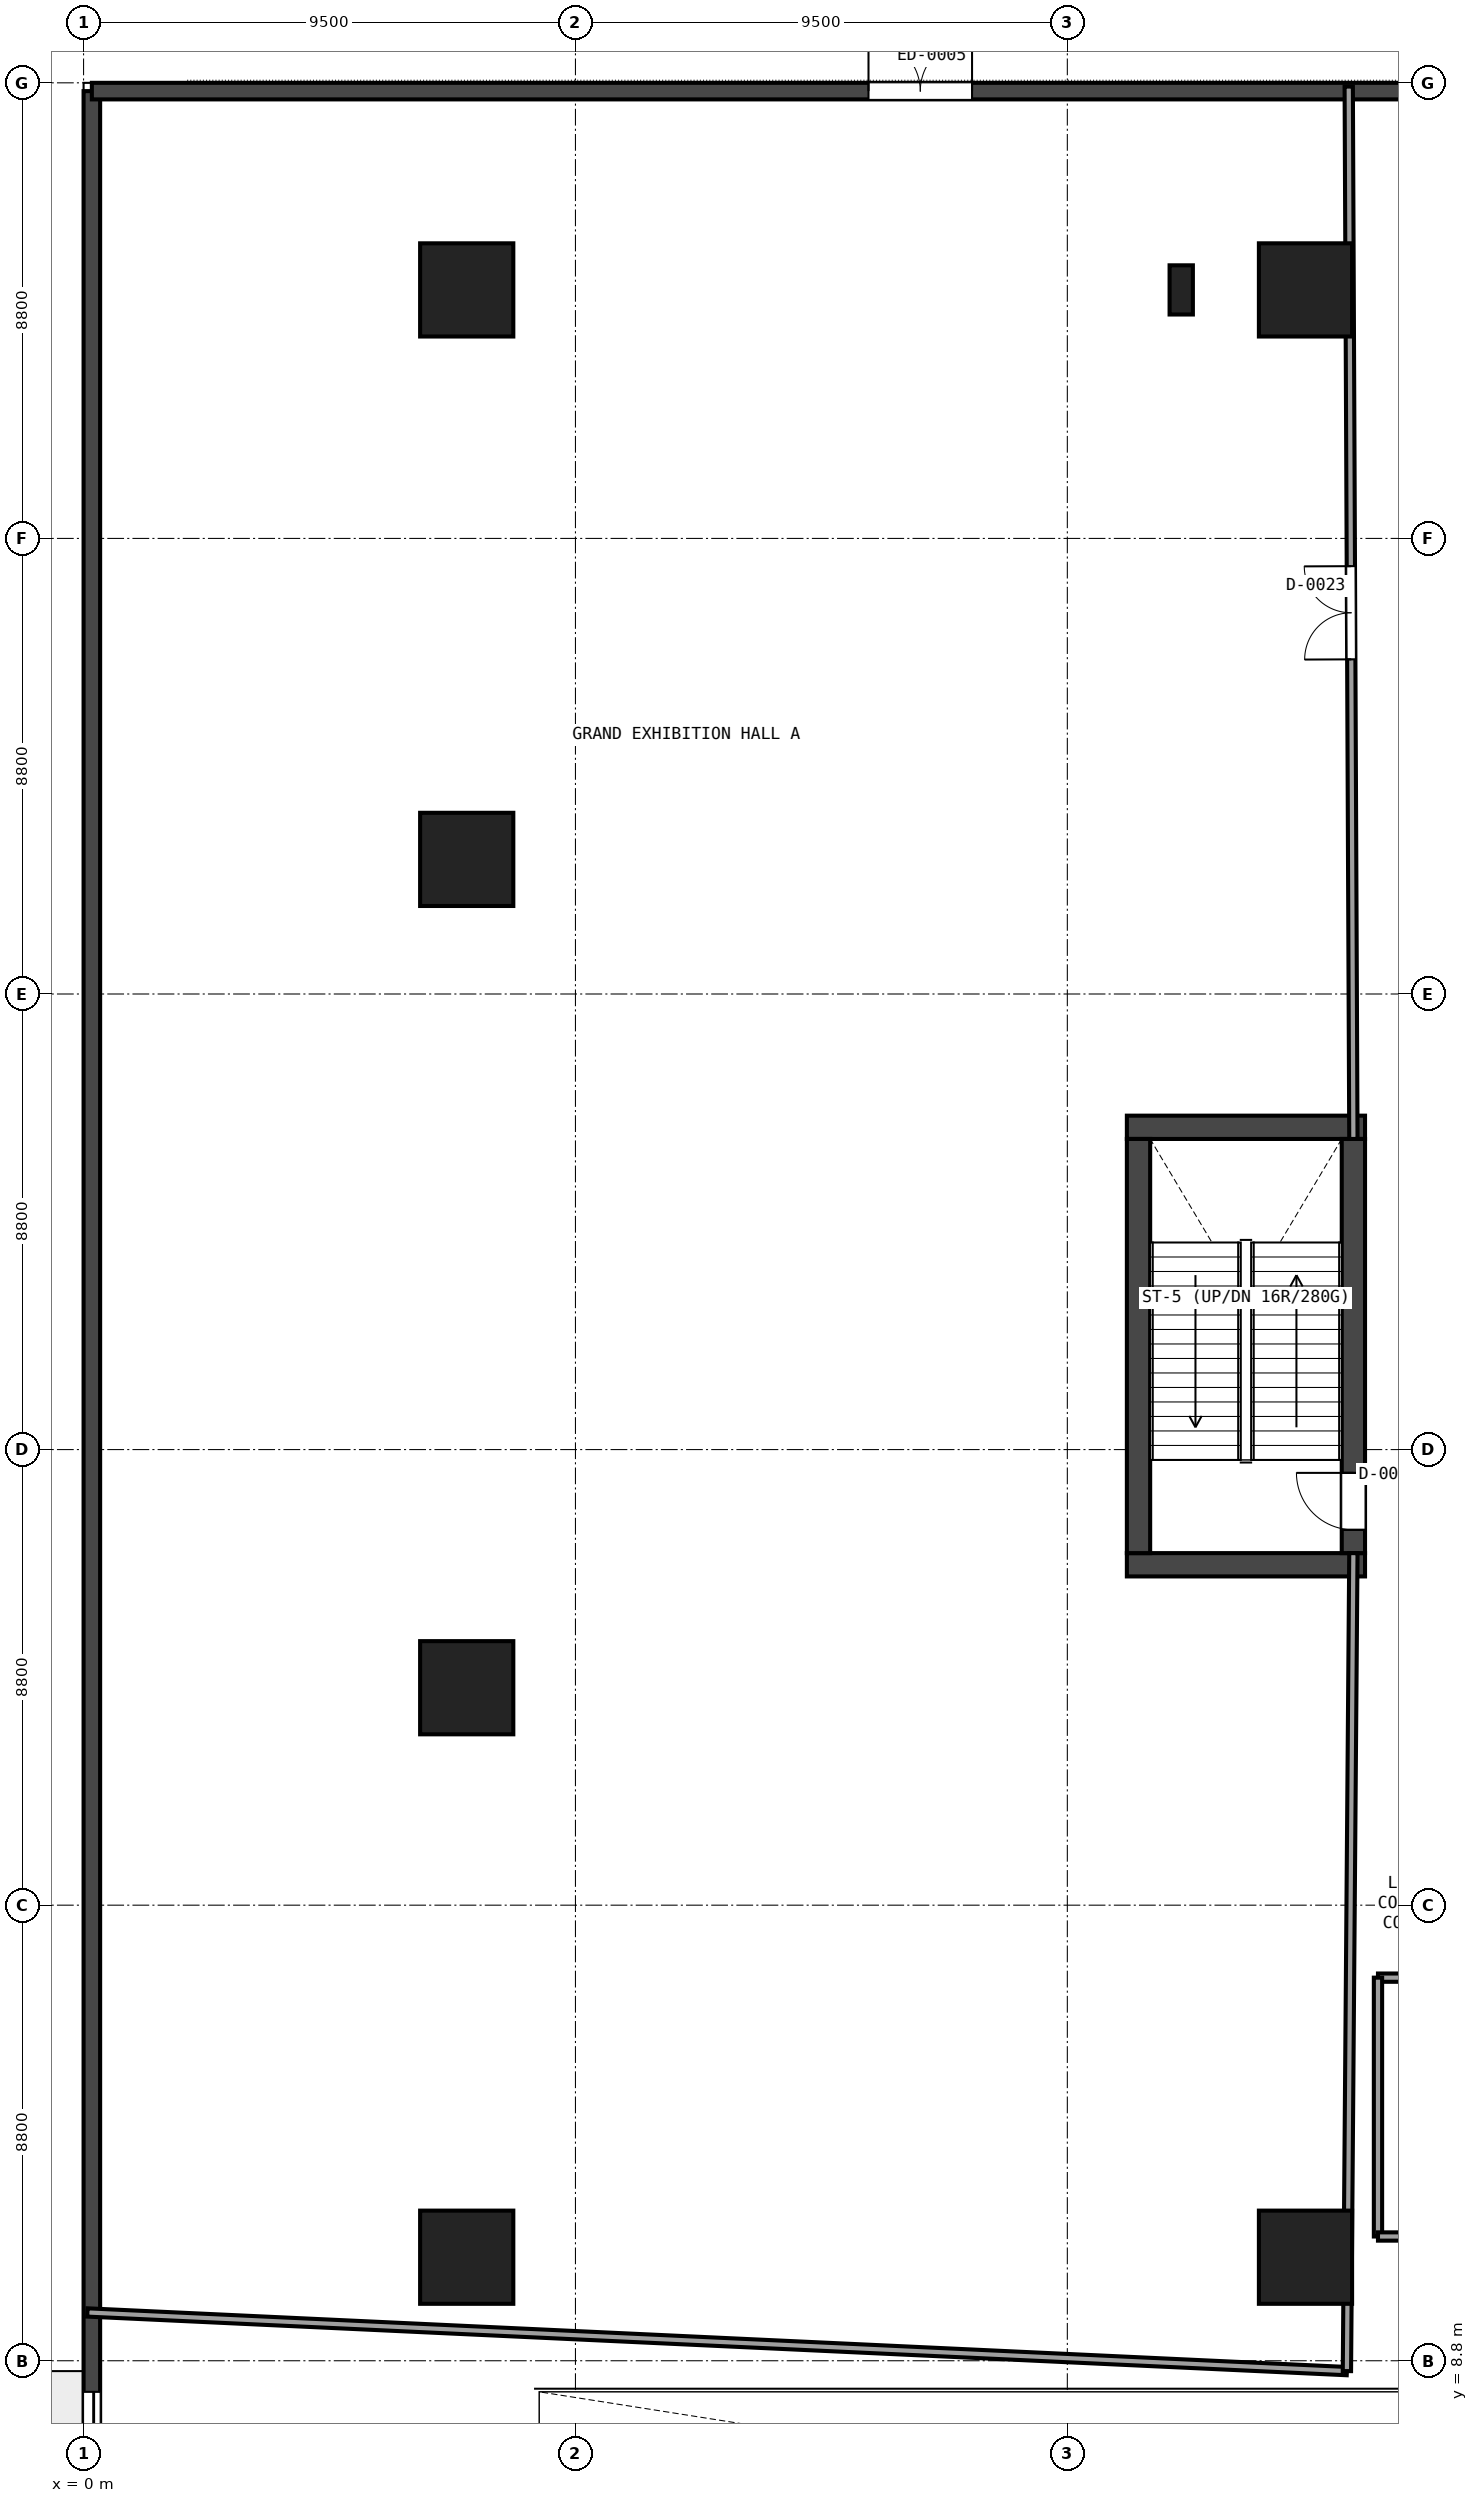
"""IFC4 building model, lengths in metres.
Left out: names, types, materials, properties, quantities, classifications, styles, units other than length and angle.
Written with IfcOpenShell. Run it as: python <this file> out.ifc"""

import sys

from ifc_helpers import new_model, si_unit, direction, frame, frame_2d, origin, origin_2d, place, context, subcontext, project, spatial, rectangle, extrude, element, fill, save


model = new_model("IFC4")
c1 = context("Model", 3, precision=1e-05, world=origin(), true_north=direction((0.0, 1.0)))
c2 = subcontext(c1, "Body", "Model", "MODEL_VIEW")
j1 = project(units=[si_unit("LENGTHUNIT", "METRE"), si_unit("PLANEANGLEUNIT", "RADIAN")], contexts=[c1])
p1 = place(None, origin())
s1 = spatial("IfcSite", under=j1, at=p1, CompositionType="ELEMENT")
p2 = place(p1, origin())
s2 = spatial("IfcBuilding", under=s1, at=p2, CompositionType="ELEMENT")
p3 = place(p2, origin())
s3 = spatial("IfcBuildingStorey", under=s2, at=p3, CompositionType="ELEMENT", Elevation=0.0)
for number, where, z_axis, x_axis in (
    (1, (20.15, 24.175, 0.0), (0.0, 0.0, 1.0), (1.0, 0.0, 0.0)),
    (2, (20.15, 32.625, 0.0), (0.0, 0.0, 1.0), (1.0, 0.0, 0.0)),
):
    element("IfcWall", number, at=place(p3, frame(where, z_axis=z_axis, x_axis=x_axis)), inside=s3, PredefinedType="SHEAR", context=c2, shape_type="SweptSolid", body=[
        extrude(rectangle(XDim=4.6, YDim=0.45, at=frame_2d((2.3, 0.0))), origin(), (0.0, 0.0, 1.0), 5.05),
    ])
p4 = place(p3, frame((20.375, 24.4, 0.0), z_axis=(0.0, 0.0, 1.0), x_axis=(0.0, 1.0, 0.0)))
e3 = element("IfcWall", 3, at=p4, inside=s3, PredefinedType="SHEAR", context=c2, shape_type="SweptSolid", body=[
    extrude(rectangle(XDim=8.0, YDim=0.45, at=frame_2d((4.0, 0.0))), origin(), (0.0, 0.0, 1.0), 5.05),
])
p5 = place(p3, frame((24.525, 24.4, 0.0), z_axis=(0.0, 0.0, 1.0), x_axis=(0.0, 1.0, 0.0)))
e4 = element("IfcWall", 4, at=p5, inside=s3, PredefinedType="SHEAR", context=c2, shape_type="SweptSolid", body=[
    extrude(rectangle(XDim=8.0, YDim=0.45, at=frame_2d((4.0, 0.0))), origin(), (0.0, 0.0, 1.0), 5.05),
])
p6 = place(p5, frame((0.45, 0.0, 0.0)))
e5 = element("IfcOpeningElement", 5, at=p6, cuts=e4, PredefinedType="OPENING", context=c2, shape_type="SweptSolid", body=[
    extrude(rectangle(XDim=1.1, YDim=2.15, at=frame_2d((0.55, 1.075))), frame((0.0, 0.235, 0.0), z_axis=(0.0, -1.0, 0.0), x_axis=(1.0, 0.0, 0.0)), (0.0, 0.0, 1.0), 0.47),
])
for number, where, z_axis, x_axis in (
    (6, (7.4, 10.8, 0.0), (0.0, 0.0, 1.0), (1.0, 0.0, 0.0)),
    (7, (23.6, 10.8, 0.0), (0.0, 0.0, 1.0), (1.0, 0.0, 0.0)),
    (8, (23.6, 48.8, 0.0), (0.0, 0.0, 1.0), (1.0, 0.0, 0.0)),
    (9, (7.4, 48.8, 0.0), (0.0, 0.0, 1.0), (1.0, 0.0, 0.0)),
    (10, (7.4, 37.8, 0.0), (0.0, 0.0, 1.0), (1.0, 0.0, 0.0)),
    (11, (7.4, 21.8, 0.0), (0.0, 0.0, 1.0), (1.0, 0.0, 0.0)),
):
    element("IfcColumn", number, at=place(p3, frame(where, z_axis=z_axis, x_axis=x_axis)), inside=s3, PredefinedType="COLUMN", context=c2, shape_type="SweptSolid", body=[
        extrude(rectangle(XDim=1.8, YDim=1.8, at=origin_2d()), origin(), (0.0, 0.0, 1.0), 5.05),
    ])
p7 = place(p3, frame((21.2, 48.8, 0.0), z_axis=(0.0, 0.0, 1.0), x_axis=(1.0, 0.0, 0.0)))
e12 = element("IfcColumn", 12, at=p7, inside=s3, PredefinedType="PILASTER", context=c2, shape_type="SweptSolid", body=[
    extrude(rectangle(XDim=0.45, YDim=0.95, at=origin_2d()), origin(), (0.0, 0.0, 1.0), 5.05),
])
p8 = place(p3, frame((0.16, 0.16, 0.0), z_axis=(0.0, 0.0, 1.0), x_axis=(0.0, 1.0, 0.0)))
e13 = element("IfcWall", 13, at=p8, inside=s3, PredefinedType="SOLIDWALL", context=c2, shape_type="SweptSolid", body=[
    extrude(rectangle(XDim=52.48, YDim=0.32, at=frame_2d((26.24, 0.0))), origin(), (0.0, 0.0, 1.0), 5.05),
])
p9 = place(p8, frame((1.24, 0.0, 0.0)))
e14 = element("IfcOpeningElement", 14, at=p9, cuts=e13, PredefinedType="OPENING", context=c2, shape_type="SweptSolid", body=[
    extrude(rectangle(XDim=6.8, YDim=3.6, at=frame_2d((3.4, 1.8))), frame((0.0, 0.17, 0.0), z_axis=(0.0, -1.0, 0.0), x_axis=(1.0, 0.0, 0.0)), (0.0, 0.0, 1.0), 0.34),
])
p10 = place(p3, frame((0.16, 52.64, 0.0), z_axis=(0.0, 0.0, 1.0), x_axis=(1.0, 0.0, 0.0)))
e15 = element("IfcWall", 15, at=p10, inside=s3, PredefinedType="SOLIDWALL", context=c2, shape_type="SweptSolid", body=[
    extrude(rectangle(XDim=75.68, YDim=0.32, at=frame_2d((37.84, 0.0))), origin(), (0.0, 0.0, 1.0), 5.05),
])
p11 = place(p10, frame((15.0, 0.0, 0.0)))
e16 = element("IfcOpeningElement", 16, at=p11, cuts=e15, PredefinedType="OPENING", context=c2, shape_type="SweptSolid", body=[
    extrude(rectangle(XDim=2.0, YDim=2.4, at=frame_2d((1.0, 1.2))), frame((0.0, 0.17, 0.0), z_axis=(0.0, -1.0, 0.0), x_axis=(1.0, 0.0, 0.0)), (0.0, 0.0, 1.0), 0.34),
])
p12 = place(p10, frame((29.5, 0.0, 0.0)))
e17 = element("IfcOpeningElement", 17, at=p12, cuts=e15, PredefinedType="OPENING", context=c2, shape_type="SweptSolid", body=[
    extrude(rectangle(XDim=2.0, YDim=2.4, at=frame_2d((1.0, 1.2))), frame((0.0, 0.17, 0.0), z_axis=(0.0, -1.0, 0.0), x_axis=(1.0, 0.0, 0.0)), (0.0, 0.0, 1.0), 0.34),
])
p13 = place(p10, frame((42.5, 0.0, 0.0)))
e18 = element("IfcOpeningElement", 18, at=p13, cuts=e15, PredefinedType="OPENING", context=c2, shape_type="SweptSolid", body=[
    extrude(rectangle(XDim=2.0, YDim=2.4, at=frame_2d((1.0, 1.2))), frame((0.0, 0.17, 0.0), z_axis=(0.0, -1.0, 0.0), x_axis=(1.0, 0.0, 0.0)), (0.0, 0.0, 1.0), 0.34),
])
p14 = place(p10, frame((58.0, 0.0, 0.0)))
e19 = element("IfcOpeningElement", 19, at=p14, cuts=e15, PredefinedType="OPENING", context=c2, shape_type="SweptSolid", body=[
    extrude(rectangle(XDim=2.0, YDim=2.4, at=frame_2d((1.0, 1.2))), frame((0.0, 0.17, 0.0), z_axis=(0.0, -1.0, 0.0), x_axis=(1.0, 0.0, 0.0)), (0.0, 0.0, 1.0), 0.34),
])
p15 = place(p3, frame((31.8, 16.2, 0.0), z_axis=(0.0, 0.0, 1.0), x_axis=(-1.0, 0.0, 0.0)))
e20 = element("IfcWall", 20, at=p15, inside=s3, PredefinedType="PARTITIONING", context=c2, shape_type="SweptSolid", body=[
    extrude(rectangle(XDim=6.8, YDim=0.16, at=frame_2d((3.4, 0.0))), origin(), (0.0, 0.0, 1.0), 4.135),
])
p16 = place(p15, frame((2.9, 0.0, 0.0)))
e21 = element("IfcOpeningElement", 21, at=p16, cuts=e20, PredefinedType="OPENING", context=c2, shape_type="SweptSolid", body=[
    extrude(rectangle(XDim=1.0, YDim=2.15, at=frame_2d((0.5, 1.075))), frame((0.0, 0.09, 0.0), z_axis=(0.0, -1.0, 0.0), x_axis=(1.0, 0.0, 0.0)), (0.0, 0.0, 1.0), 0.18),
])
p17 = place(p3, frame((25.0, 16.2, 0.0), z_axis=(0.0, 0.0, 1.0), x_axis=(0.0, -1.0, 0.0)))
e22 = element("IfcWall", 22, at=p17, inside=s3, PredefinedType="PARTITIONING", context=c2, shape_type="SweptSolid", body=[
    extrude(rectangle(XDim=5.0, YDim=0.16, at=frame_2d((2.5, 0.0))), origin(), (0.0, 0.0, 1.0), 4.135),
])
p18 = place(p3, frame((25.0, 11.2, 0.0), z_axis=(0.0, 0.0, 1.0), x_axis=(1.0, 0.0, 0.0)))
e23 = element("IfcWall", 23, at=p18, inside=s3, PredefinedType="PARTITIONING", context=c2, shape_type="SweptSolid", body=[
    extrude(rectangle(XDim=6.8, YDim=0.16, at=frame_2d((3.4, 0.0))), origin(), (0.0, 0.0, 1.0), 5.05),
])
p19 = place(p3, frame((24.525, 32.4, 0.0), z_axis=(0.0, 0.0, 1.0), x_axis=(-0.004419634006, 0.99999023337, 0.0)))
e24 = element("IfcWall", 24, at=p19, inside=s3, PredefinedType="PARTITIONING", context=c2, shape_type="SweptSolid", body=[
    extrude(rectangle(XDim=20.328, YDim=0.16, at=frame_2d((10.164, 0.0))), origin(), (0.0, 0.0, 1.0), 4.123),
])
p20 = place(p19, frame((9.264, 0.0, 0.0)))
e25 = element("IfcOpeningElement", 25, at=p20, cuts=e24, PredefinedType="OPENING", context=c2, shape_type="SweptSolid", body=[
    extrude(rectangle(XDim=1.8, YDim=2.25, at=frame_2d((0.9, 1.125))), frame((0.0, 0.09, 0.0), z_axis=(0.0, -1.0, 0.0), x_axis=(1.0, 0.0, 0.0)), (0.0, 0.0, 1.0), 0.18),
])
p21 = place(p3, frame((0.073, 9.733, 0.0), z_axis=(0.0, 0.0, 1.0), x_axis=(0.998917552656, -0.046515835978, 0.0)))
e26 = element("IfcWall", 26, at=p21, inside=s3, PredefinedType="PARTITIONING", context=c2, shape_type="SweptSolid", body=[
    extrude(rectangle(XDim=24.353, YDim=0.16, at=frame_2d((12.177, 0.0))), origin(), (0.0, 0.0, 1.0), 4.203),
])
p22 = place(p3, frame((24.4, 8.6, 0.0), z_axis=(0.0, 0.0, 1.0), x_axis=(0.007911242618, 0.99996870563, 0.0)))
e27 = element("IfcWall", 27, at=p22, inside=s3, PredefinedType="PARTITIONING", context=c2, shape_type="SweptSolid", body=[
    extrude(rectangle(XDim=15.8, YDim=0.16, at=frame_2d((7.9, 0.0))), origin(), (0.0, 0.0, 1.0), 4.135),
])
p23 = place(p9, origin())
e28 = element("IfcDoor", 28, at=p23, inside=s3, OperationType="SLIDING_TO_LEFT", PredefinedType="GATE", context=c2, shape_type="SweptSolid", body=[
    extrude(rectangle(XDim=6.8, YDim=3.6, at=frame_2d((3.4, 1.8))), frame((0.0, 0.025, 0.0), z_axis=(0.0, -1.0, 0.0), x_axis=(1.0, 0.0, 0.0)), (0.0, 0.0, 1.0), 0.05),
])
fill(e14, e28)
p24 = place(p11, origin())
e29 = element("IfcDoor", 29, at=p24, inside=s3, OperationType="DOUBLE_DOOR_SINGLE_SWING", PredefinedType="DOOR", context=c2, shape_type="SweptSolid", body=[
    extrude(rectangle(XDim=2.0, YDim=2.4, at=frame_2d((1.0, 1.2))), frame((0.0, 0.025, 0.0), z_axis=(0.0, -1.0, 0.0), x_axis=(1.0, 0.0, 0.0)), (0.0, 0.0, 1.0), 0.05),
])
fill(e16, e29)
p25 = place(p6, origin())
e30 = element("IfcDoor", 30, at=p25, inside=s3, OperationType="SINGLE_SWING_RIGHT", PredefinedType="DOOR", context=c2, shape_type="SweptSolid", body=[
    extrude(rectangle(XDim=1.1, YDim=2.15, at=frame_2d((0.55, 1.075))), frame((0.0, 0.025, 0.0), z_axis=(0.0, -1.0, 0.0), x_axis=(1.0, 0.0, 0.0)), (0.0, 0.0, 1.0), 0.05),
])
fill(e5, e30)
p26 = place(p20, origin())
e31 = element("IfcDoor", 31, at=p26, inside=s3, OperationType="DOUBLE_DOOR_SINGLE_SWING", PredefinedType="DOOR", context=c2, shape_type="SweptSolid", body=[
    extrude(rectangle(XDim=1.8, YDim=2.25, at=frame_2d((0.9, 1.125))), frame((0.0, 0.025, 0.0), z_axis=(0.0, -1.0, 0.0), x_axis=(1.0, 0.0, 0.0)), (0.0, 0.0, 1.0), 0.05),
])
fill(e25, e31)
save(model, sys.argv[1])
